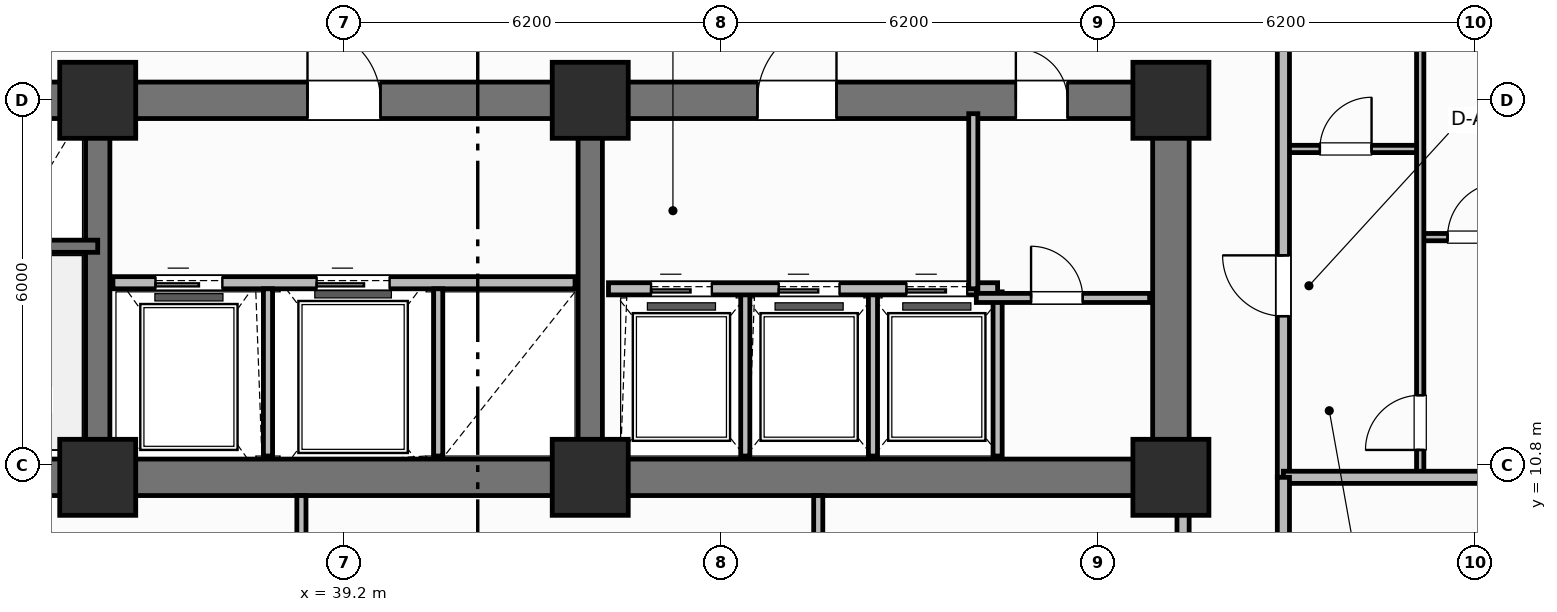
"""IFC4 building model, lengths in metres.
Left out: names, types, materials, properties, quantities, classifications, styles, units other than length and angle.
Written with IfcOpenShell. Run it as: python <this file> out.ifc"""

import sys

from ifc_helpers import new_model, si_unit, direction, frame, frame_2d, origin, origin_2d, place, context, subcontext, project, spatial, rectangle, extrude, element, fill, save


model = new_model("IFC4")
c1 = context("Model", 3, precision=1e-05, world=origin(), true_north=direction((0.0, 1.0)))
c2 = subcontext(c1, "Body", "Model", "MODEL_VIEW")
j1 = project(units=[si_unit("LENGTHUNIT", "METRE"), si_unit("PLANEANGLEUNIT", "RADIAN")], contexts=[c1])
p1 = place(None, origin())
s1 = spatial("IfcSite", under=j1, at=p1, CompositionType="ELEMENT")
p2 = place(p1, origin())
s2 = spatial("IfcBuilding", under=s1, at=p2, CompositionType="ELEMENT")
p3 = place(p2, frame((0.0, 0.0, 43.6)))
s3 = spatial("IfcBuildingStorey", under=s2, at=p3, CompositionType="ELEMENT", Elevation=43.6)
p4 = place(p3, frame((52.8, 10.6, 0.0), z_axis=(0.0, 0.0, 1.0), x_axis=(-1.0, 0.0, 0.0)))
e1 = element("IfcWall", 1, at=p4, inside=s3, PredefinedType="SHEAR", context=c2, shape_type="SweptSolid", body=[
    extrude(rectangle(XDim=27.2, YDim=0.6, at=frame_2d((13.6, 0.0))), origin(), (0.0, 0.0, 1.0), 3.7),
])
p5 = place(p3, frame((52.8, 10.9, 0.0), z_axis=(0.0, 0.0, 1.0), x_axis=(0.0, 1.0, 0.0)))
e2 = element("IfcWall", 2, at=p5, inside=s3, PredefinedType="SHEAR", context=c2, shape_type="SweptSolid", body=[
    extrude(rectangle(XDim=5.6, YDim=0.6, at=frame_2d((2.8, 0.0))), origin(), (0.0, 0.0, 1.0), 3.7),
])
p6 = place(p3, frame((25.6, 16.8, 0.0), z_axis=(0.0, 0.0, 1.0), x_axis=(1.0, 0.0, 0.0)))
e3 = element("IfcWall", 3, at=p6, inside=s3, PredefinedType="SHEAR", context=c2, shape_type="SweptSolid", body=[
    extrude(rectangle(XDim=27.2, YDim=0.6, at=frame_2d((13.6, 0.0))), origin(), (0.0, 0.0, 1.0), 3.7),
])
p7 = place(p6, frame((1.7, 0.0, 0.0)))
e4 = element("IfcOpeningElement", 4, at=p7, cuts=e3, PredefinedType="OPENING", context=c2, shape_type="SweptSolid", body=[
    extrude(rectangle(XDim=1.1, YDim=2.15, at=frame_2d((0.55, 1.075))), frame((0.0, 0.31, 0.0), z_axis=(0.0, -1.0, 0.0), x_axis=(1.0, 0.0, 0.0)), (0.0, 0.0, 1.0), 0.62),
])
p8 = place(p6, frame((4.45, 0.0, 0.0)))
e5 = element("IfcOpeningElement", 5, at=p8, cuts=e3, PredefinedType="OPENING", context=c2, shape_type="SweptSolid", body=[
    extrude(rectangle(XDim=0.85, YDim=2.1, at=frame_2d((0.425, 1.05))), frame((0.0, 0.31, 0.0), z_axis=(0.0, -1.0, 0.0), x_axis=(1.0, 0.0, 0.0)), (0.0, 0.0, 1.0), 0.62),
])
p9 = place(p6, frame((6.5, 0.0, 0.0)))
e6 = element("IfcOpeningElement", 6, at=p9, cuts=e3, PredefinedType="OPENING", context=c2, shape_type="SweptSolid", body=[
    extrude(rectangle(XDim=0.85, YDim=2.1, at=frame_2d((0.425, 1.05))), frame((0.0, 0.31, 0.0), z_axis=(0.0, -1.0, 0.0), x_axis=(1.0, 0.0, 0.0)), (0.0, 0.0, 1.0), 0.62),
])
p10 = place(p6, frame((13.0, 0.0, 0.0)))
e7 = element("IfcOpeningElement", 7, at=p10, cuts=e3, PredefinedType="OPENING", context=c2, shape_type="SweptSolid", body=[
    extrude(rectangle(XDim=1.2, YDim=2.15, at=frame_2d((0.6, 1.075))), frame((0.0, 0.31, 0.0), z_axis=(0.0, -1.0, 0.0), x_axis=(1.0, 0.0, 0.0)), (0.0, 0.0, 1.0), 0.62),
])
p11 = place(p6, frame((20.4, 0.0, 0.0)))
e8 = element("IfcOpeningElement", 8, at=p11, cuts=e3, PredefinedType="OPENING", context=c2, shape_type="SweptSolid", body=[
    extrude(rectangle(XDim=1.3, YDim=2.2, at=frame_2d((0.65, 1.1))), frame((0.0, 0.31, 0.0), z_axis=(0.0, -1.0, 0.0), x_axis=(1.0, 0.0, 0.0)), (0.0, 0.0, 1.0), 0.62),
])
p12 = place(p6, frame((24.65, 0.0, 0.0)))
e9 = element("IfcOpeningElement", 9, at=p12, cuts=e3, PredefinedType="OPENING", context=c2, shape_type="SweptSolid", body=[
    extrude(rectangle(XDim=0.85, YDim=2.1, at=frame_2d((0.425, 1.05))), frame((0.0, 0.31, 0.0), z_axis=(0.0, -1.0, 0.0), x_axis=(1.0, 0.0, 0.0)), (0.0, 0.0, 1.0), 0.62),
])
for number, where, z_axis, x_axis in (
    (10, (35.15, 10.9, 0.0), (0.0, 0.0, 1.0), (0.0, 1.0, 0.0)),
    (11, (43.25, 10.9, 0.0), (0.0, 0.0, 1.0), (0.0, 1.0, 0.0)),
):
    element("IfcWall", number, at=place(p3, frame(where, z_axis=z_axis, x_axis=x_axis)), inside=s3, PredefinedType="SHEAR", context=c2, shape_type="SweptSolid", body=[
        extrude(rectangle(XDim=5.6, YDim=0.4, at=frame_2d((2.8, 0.0))), origin(), (0.0, 0.0, 1.0), 3.7),
    ])
for number, where, z_axis, x_axis in (
    (12, (35.15, 10.6, 0.0), (0.0, 0.0, 1.0), (1.0, 0.0, 0.0)),
    (13, (35.15, 16.8, 0.0), (0.0, 0.0, 1.0), (1.0, 0.0, 0.0)),
    (14, (43.25, 10.6, 0.0), (0.0, 0.0, 1.0), (1.0, 0.0, 0.0)),
    (15, (43.25, 16.8, 0.0), (0.0, 0.0, 1.0), (1.0, 0.0, 0.0)),
    (16, (52.8, 10.6, 0.0), (0.0, 0.0, 1.0), (1.0, 0.0, 0.0)),
    (17, (52.8, 16.8, 0.0), (0.0, 0.0, 1.0), (1.0, 0.0, 0.0)),
):
    element("IfcColumn", number, at=place(p3, frame(where, z_axis=z_axis, x_axis=x_axis)), inside=s3, PredefinedType="COLUMN", context=c2, shape_type="SweptSolid", body=[
        extrude(rectangle(XDim=1.25, YDim=1.25, at=origin_2d()), origin(), (0.0, 0.0, 1.0), 3.7),
    ])
p13 = place(p3, frame((25.6, 14.4, 0.0), z_axis=(0.0, 0.0, 1.0), x_axis=(1.0, 0.0, 0.0)))
e18 = element("IfcWall", 18, at=p13, inside=s3, PredefinedType="SHEAR", context=c2, shape_type="SweptSolid", body=[
    extrude(rectangle(XDim=9.55, YDim=0.2, at=frame_2d((4.775, 0.0))), origin(), (0.0, 0.0, 1.0), 3.7),
])
p14 = place(p13, frame((1.05, 0.0, 0.0)))
e19 = element("IfcOpeningElement", 19, at=p14, cuts=e18, PredefinedType="OPENING", context=c2, shape_type="SweptSolid", body=[
    extrude(rectangle(XDim=1.1, YDim=2.15, at=frame_2d((0.55, 1.075))), frame((0.0, 0.11, 0.0), z_axis=(0.0, -1.0, 0.0), x_axis=(1.0, 0.0, 0.0)), (0.0, 0.0, 1.0), 0.22),
])
p15 = place(p3, frame((35.4, 13.8, 0.0), z_axis=(0.0, 0.0, 1.0), x_axis=(1.0, 0.0, 0.0)))
e20 = element("IfcWall", 20, at=p15, inside=s3, PredefinedType="PARTITIONING", context=c2, shape_type="SweptSolid", body=[
    extrude(rectangle(XDim=7.6, YDim=0.2, at=frame_2d((3.8, 0.0))), origin(), (0.0, 0.0, 1.0), 2.3),
])
p16 = place(p15, frame((0.7, 0.0, 0.0)))
e21 = element("IfcOpeningElement", 21, at=p16, cuts=e20, PredefinedType="OPENING", context=c2, shape_type="SweptSolid", body=[
    extrude(rectangle(XDim=1.1, YDim=2.15, at=frame_2d((0.55, 1.075))), frame((0.0, 0.11, 0.0), z_axis=(0.0, -1.0, 0.0), x_axis=(1.0, 0.0, 0.0)), (0.0, 0.0, 1.0), 0.22),
])
p17 = place(p15, frame((3.35, 0.0, 0.0)))
e22 = element("IfcOpeningElement", 22, at=p17, cuts=e20, PredefinedType="OPENING", context=c2, shape_type="SweptSolid", body=[
    extrude(rectangle(XDim=1.2, YDim=2.15, at=frame_2d((0.6, 1.075))), frame((0.0, 0.11, 0.0), z_axis=(0.0, -1.0, 0.0), x_axis=(1.0, 0.0, 0.0)), (0.0, 0.0, 1.0), 0.22),
])
for number, where, z_axis, x_axis in (
    (23, (37.95, 10.95, 0.0), (0.0, 0.0, 1.0), (0.0, 1.0, 0.0)),
    (24, (40.75, 10.95, 0.0), (0.0, 0.0, 1.0), (0.0, 1.0, 0.0)),
):
    element("IfcWall", number, at=place(p3, frame(where, z_axis=z_axis, x_axis=x_axis)), inside=s3, PredefinedType="PARTITIONING", context=c2, shape_type="SweptSolid", body=[
        extrude(rectangle(XDim=2.75, YDim=0.15, at=frame_2d((1.375, 0.0))), origin(), (0.0, 0.0, 1.0), 2.53),
    ])
for number, where, z_axis, x_axis in (
    (25, (45.8, 10.95, 0.0), (0.0, 0.0, 1.0), (0.0, 1.0, 0.0)),
    (26, (47.9, 10.95, 0.0), (0.0, 0.0, 1.0), (0.0, 1.0, 0.0)),
    (27, (49.95, 10.95, 0.0), (0.0, 0.0, 1.0), (0.0, 1.0, 0.0)),
):
    element("IfcWall", number, at=place(p3, frame(where, z_axis=z_axis, x_axis=x_axis)), inside=s3, PredefinedType="PARTITIONING", context=c2, shape_type="SweptSolid", body=[
        extrude(rectangle(XDim=2.7, YDim=0.15, at=frame_2d((1.35, 0.0))), origin(), (0.0, 0.0, 1.0), 2.53),
    ])
p18 = place(p3, frame((43.55, 13.7, 0.0), z_axis=(0.0, 0.0, 1.0), x_axis=(1.0, 0.0, 0.0)))
e28 = element("IfcWall", 28, at=p18, inside=s3, PredefinedType="PARTITIONING", context=c2, shape_type="SweptSolid", body=[
    extrude(rectangle(XDim=6.4, YDim=0.2, at=frame_2d((3.2, 0.0))), origin(), (0.0, 0.0, 1.0), 2.53),
])
p19 = place(p18, frame((0.7, 0.0, 0.0)))
e29 = element("IfcOpeningElement", 29, at=p19, cuts=e28, PredefinedType="OPENING", context=c2, shape_type="SweptSolid", body=[
    extrude(rectangle(XDim=1.0, YDim=2.15, at=frame_2d((0.5, 1.075))), frame((0.0, 0.11, 0.0), z_axis=(0.0, -1.0, 0.0), x_axis=(1.0, 0.0, 0.0)), (0.0, 0.0, 1.0), 0.22),
])
p20 = place(p18, frame((2.8, 0.0, 0.0)))
e30 = element("IfcOpeningElement", 30, at=p20, cuts=e28, PredefinedType="OPENING", context=c2, shape_type="SweptSolid", body=[
    extrude(rectangle(XDim=1.0, YDim=2.15, at=frame_2d((0.5, 1.075))), frame((0.0, 0.11, 0.0), z_axis=(0.0, -1.0, 0.0), x_axis=(1.0, 0.0, 0.0)), (0.0, 0.0, 1.0), 0.22),
])
p21 = place(p18, frame((4.9, 0.0, 0.0)))
e31 = element("IfcOpeningElement", 31, at=p21, cuts=e28, PredefinedType="OPENING", context=c2, shape_type="SweptSolid", body=[
    extrude(rectangle(XDim=1.0, YDim=2.15, at=frame_2d((0.5, 1.075))), frame((0.0, 0.11, 0.0), z_axis=(0.0, -1.0, 0.0), x_axis=(1.0, 0.0, 0.0)), (0.0, 0.0, 1.0), 0.22),
])
p22 = place(p3, frame((49.55, 13.7, 0.0), z_axis=(0.0, 0.0, 1.0), x_axis=(0.0, 1.0, 0.0)))
e32 = element("IfcWall", 32, at=p22, inside=s3, PredefinedType="PARTITIONING", context=c2, shape_type="SweptSolid", body=[
    extrude(rectangle(XDim=2.88, YDim=0.15, at=frame_2d((1.44, 0.0))), origin(), (0.0, 0.0, 1.0), 2.53),
])
p23 = place(p3, frame((49.6, 13.55, 0.0), z_axis=(0.0, 0.0, 1.0), x_axis=(1.0, 0.0, 0.0)))
e33 = element("IfcWall", 33, at=p23, inside=s3, PredefinedType="PARTITIONING", context=c2, shape_type="SweptSolid", body=[
    extrude(rectangle(XDim=2.85, YDim=0.15, at=frame_2d((1.425, 0.0))), origin(), (0.0, 0.0, 1.0), 2.53),
])
p24 = place(p23, frame((0.9, 0.0, 0.0)))
e34 = element("IfcOpeningElement", 34, at=p24, cuts=e33, PredefinedType="OPENING", context=c2, shape_type="SweptSolid", body=[
    extrude(rectangle(XDim=0.85, YDim=2.1, at=frame_2d((0.425, 1.05))), frame((0.0, 0.085, 0.0), z_axis=(0.0, -1.0, 0.0), x_axis=(1.0, 0.0, 0.0)), (0.0, 0.0, 1.0), 0.17),
])
p25 = place(p3, frame((54.65, 16.0, 0.0), z_axis=(0.0, 0.0, 1.0), x_axis=(1.0, 0.0, 0.0)))
e35 = element("IfcWall", 35, at=p25, inside=s3, PredefinedType="PARTITIONING", context=c2, shape_type="SweptSolid", body=[
    extrude(rectangle(XDim=2.25, YDim=0.12, at=frame_2d((1.125, 0.0))), origin(), (0.0, 0.0, 1.0), 2.53),
])
p26 = place(p25, frame((0.6, 0.0, 0.0)))
e36 = element("IfcOpeningElement", 36, at=p26, cuts=e35, PredefinedType="OPENING", context=c2, shape_type="SweptSolid", body=[
    extrude(rectangle(XDim=0.85, YDim=2.1, at=frame_2d((0.425, 1.05))), frame((0.0, 0.07, 0.0), z_axis=(0.0, -1.0, 0.0), x_axis=(1.0, 0.0, 0.0)), (0.0, 0.0, 1.0), 0.14),
])
p27 = place(p3, frame((56.9, 14.55, 0.0), z_axis=(0.0, 0.0, 1.0), x_axis=(1.0, 0.0, 0.0)))
e37 = element("IfcWall", 37, at=p27, inside=s3, PredefinedType="PARTITIONING", context=c2, shape_type="SweptSolid", body=[
    extrude(rectangle(XDim=6.93, YDim=0.12, at=frame_2d((3.465, 0.0))), origin(), (0.0, 0.0, 1.0), 2.53),
])
p28 = place(p27, frame((0.45, 0.0, 0.0)))
e38 = element("IfcOpeningElement", 38, at=p28, cuts=e37, PredefinedType="OPENING", context=c2, shape_type="SweptSolid", body=[
    extrude(rectangle(XDim=0.9, YDim=2.1, at=frame_2d((0.45, 1.05))), frame((0.0, 0.07, 0.0), z_axis=(0.0, -1.0, 0.0), x_axis=(1.0, 0.0, 0.0)), (0.0, 0.0, 1.0), 0.14),
])
p29 = place(p3, frame((56.9, 10.64, 0.0), z_axis=(0.0, 0.0, 1.0), x_axis=(0.0, 1.0, 0.0)))
e39 = element("IfcWall", 39, at=p29, inside=s3, PredefinedType="PARTITIONING", context=c2, shape_type="SweptSolid", body=[
    extrude(rectangle(XDim=15.92, YDim=0.12, at=frame_2d((7.96, 0.0))), origin(), (0.0, 0.0, 1.0), 2.53),
])
p30 = place(p29, frame((0.41, 0.0, 0.0)))
e40 = element("IfcOpeningElement", 40, at=p30, cuts=e39, PredefinedType="OPENING", context=c2, shape_type="SweptSolid", body=[
    extrude(rectangle(XDim=0.9, YDim=2.1, at=frame_2d((0.45, 1.05))), frame((0.0, 0.07, 0.0), z_axis=(0.0, -1.0, 0.0), x_axis=(1.0, 0.0, 0.0)), (0.0, 0.0, 1.0), 0.14),
])
p31 = place(p29, frame((13.125, 0.0, 0.0)))
e41 = element("IfcOpeningElement", 41, at=p31, cuts=e39, PredefinedType="OPENING", context=c2, shape_type="SweptSolid", body=[
    extrude(rectangle(XDim=0.82, YDim=2.08, at=frame_2d((0.41, 1.04))), frame((0.0, 0.07, 0.0), z_axis=(0.0, -1.0, 0.0), x_axis=(1.0, 0.0, 0.0)), (0.0, 0.0, 1.0), 0.14),
])
p32 = place(p3, frame((54.65, 10.6, 0.0), z_axis=(0.0, 0.0, 1.0), x_axis=(0.0, 1.0, 0.0)))
e42 = element("IfcWall", 42, at=p32, inside=s3, PredefinedType="PARTITIONING", context=c2, shape_type="SweptSolid", body=[
    extrude(rectangle(XDim=35.2, YDim=0.2, at=frame_2d((17.6, 0.0))), origin(), (0.0, 0.0, 1.0), 2.53),
])
p33 = place(p32, frame((2.65, 0.0, 0.0)))
e43 = element("IfcOpeningElement", 43, at=p33, cuts=e42, PredefinedType="OPENING", context=c2, shape_type="SweptSolid", body=[
    extrude(rectangle(XDim=1.0, YDim=2.15, at=frame_2d((0.5, 1.075))), frame((0.0, 0.11, 0.0), z_axis=(0.0, -1.0, 0.0), x_axis=(1.0, 0.0, 0.0)), (0.0, 0.0, 1.0), 0.22),
])
p34 = place(p32, frame((19.95, 0.0, 0.0)))
e44 = element("IfcOpeningElement", 44, at=p34, cuts=e42, PredefinedType="OPENING", context=c2, shape_type="SweptSolid", body=[
    extrude(rectangle(XDim=1.0, YDim=2.15, at=frame_2d((0.5, 1.075))), frame((0.0, 0.11, 0.0), z_axis=(0.0, -1.0, 0.0), x_axis=(1.0, 0.0, 0.0)), (0.0, 0.0, 1.0), 0.22),
])
p35 = place(p3, frame((54.65, 10.6, 0.0), z_axis=(0.0, 0.0, 1.0), x_axis=(1.0, 0.0, 0.0)))
e45 = element("IfcWall", 45, at=p35, inside=s3, PredefinedType="PARTITIONING", context=c2, shape_type="SweptSolid", body=[
    extrude(rectangle(XDim=8.76, YDim=0.2, at=frame_2d((4.38, 0.0))), origin(), (0.0, 0.0, 1.0), 2.53),
])
p36 = place(p3, frame((54.65, 4.97, 0.0), z_axis=(0.0, 0.0, 1.0), x_axis=(0.0, 1.0, 0.0)))
e46 = element("IfcWall", 46, at=p36, inside=s3, PredefinedType="PARTITIONING", context=c2, shape_type="SweptSolid", body=[
    extrude(rectangle(XDim=5.63, YDim=0.2, at=frame_2d((2.815, 0.0))), origin(), (0.0, 0.0, 1.0), 2.53),
])
p37 = place(p3, frame((38.5, 4.97, 0.0), z_axis=(0.0, 0.0, 1.0), x_axis=(0.0, 1.0, 0.0)))
e47 = element("IfcWall", 47, at=p37, inside=s3, PredefinedType="PARTITIONING", context=c2, shape_type="SweptSolid", body=[
    extrude(rectangle(XDim=5.33, YDim=0.15, at=frame_2d((2.665, 0.0))), origin(), (0.0, 0.0, 1.0), 2.53),
])
p38 = place(p3, frame((47.0, 4.97, 0.0), z_axis=(0.0, 0.0, 1.0), x_axis=(0.0, 1.0, 0.0)))
e48 = element("IfcWall", 48, at=p38, inside=s3, PredefinedType="PARTITIONING", context=c2, shape_type="SweptSolid", body=[
    extrude(rectangle(XDim=5.33, YDim=0.15, at=frame_2d((2.665, 0.0))), origin(), (0.0, 0.0, 1.0), 2.53),
])
p39 = place(p38, frame((1.6, 0.0, 0.0)))
e49 = element("IfcOpeningElement", 49, at=p39, cuts=e48, PredefinedType="OPENING", context=c2, shape_type="SweptSolid", body=[
    extrude(rectangle(XDim=0.9, YDim=2.1, at=frame_2d((0.45, 1.05))), frame((0.0, 0.085, 0.0), z_axis=(0.0, -1.0, 0.0), x_axis=(1.0, 0.0, 0.0)), (0.0, 0.0, 1.0), 0.17),
])
p40 = place(p3, frame((53.0, 5.92, 0.0), z_axis=(0.0, 0.0, 1.0), x_axis=(0.0, 1.0, 0.0)))
e50 = element("IfcWall", 50, at=p40, inside=s3, PredefinedType="PARTITIONING", context=c2, shape_type="SweptSolid", body=[
    extrude(rectangle(XDim=4.38, YDim=0.2, at=frame_2d((2.19, 0.0))), origin(), (0.0, 0.0, 1.0), 2.53),
])
p41 = place(p40, frame((0.85, 0.0, 0.0)))
e51 = element("IfcOpeningElement", 51, at=p41, cuts=e50, PredefinedType="OPENING", context=c2, shape_type="SweptSolid", body=[
    extrude(rectangle(XDim=0.9, YDim=2.1, at=frame_2d((0.45, 1.05))), frame((0.0, 0.11, 0.0), z_axis=(0.0, -1.0, 0.0), x_axis=(1.0, 0.0, 0.0)), (0.0, 0.0, 1.0), 0.22),
])
p42 = place(p16, origin())
e52 = element("IfcDoor", 52, at=p42, inside=s3, OperationType="SLIDING_TO_LEFT", PredefinedType="DOOR", context=c2, shape_type="SweptSolid", body=[
    extrude(rectangle(XDim=1.1, YDim=2.15, at=frame_2d((0.55, 1.075))), frame((0.0, 0.025, 0.0), z_axis=(0.0, -1.0, 0.0), x_axis=(1.0, 0.0, 0.0)), (0.0, 0.0, 1.0), 0.05),
])
fill(e21, e52)
p43 = place(p17, origin())
e53 = element("IfcDoor", 53, at=p43, inside=s3, OperationType="SLIDING_TO_LEFT", PredefinedType="DOOR", context=c2, shape_type="SweptSolid", body=[
    extrude(rectangle(XDim=1.2, YDim=2.15, at=frame_2d((0.6, 1.075))), frame((0.0, 0.025, 0.0), z_axis=(0.0, -1.0, 0.0), x_axis=(1.0, 0.0, 0.0)), (0.0, 0.0, 1.0), 0.05),
])
fill(e22, e53)
p44 = place(p19, origin())
e54 = element("IfcDoor", 54, at=p44, inside=s3, OperationType="SLIDING_TO_LEFT", PredefinedType="DOOR", context=c2, shape_type="SweptSolid", body=[
    extrude(rectangle(XDim=1.0, YDim=2.15, at=frame_2d((0.5, 1.075))), frame((0.0, 0.025, 0.0), z_axis=(0.0, -1.0, 0.0), x_axis=(1.0, 0.0, 0.0)), (0.0, 0.0, 1.0), 0.05),
])
fill(e29, e54)
p45 = place(p20, origin())
e55 = element("IfcDoor", 55, at=p45, inside=s3, OperationType="SLIDING_TO_LEFT", PredefinedType="DOOR", context=c2, shape_type="SweptSolid", body=[
    extrude(rectangle(XDim=1.0, YDim=2.15, at=frame_2d((0.5, 1.075))), frame((0.0, 0.025, 0.0), z_axis=(0.0, -1.0, 0.0), x_axis=(1.0, 0.0, 0.0)), (0.0, 0.0, 1.0), 0.05),
])
fill(e30, e55)
p46 = place(p21, origin())
e56 = element("IfcDoor", 56, at=p46, inside=s3, OperationType="SLIDING_TO_LEFT", PredefinedType="DOOR", context=c2, shape_type="SweptSolid", body=[
    extrude(rectangle(XDim=1.0, YDim=2.15, at=frame_2d((0.5, 1.075))), frame((0.0, 0.025, 0.0), z_axis=(0.0, -1.0, 0.0), x_axis=(1.0, 0.0, 0.0)), (0.0, 0.0, 1.0), 0.05),
])
fill(e31, e56)
p47 = place(p24, origin())
e57 = element("IfcDoor", 57, at=p47, inside=s3, OperationType="SINGLE_SWING_LEFT", PredefinedType="DOOR", context=c2, shape_type="SweptSolid", body=[
    extrude(rectangle(XDim=0.85, YDim=2.1, at=frame_2d((0.425, 1.05))), frame((0.0, 0.025, 0.0), z_axis=(0.0, -1.0, 0.0), x_axis=(1.0, 0.0, 0.0)), (0.0, 0.0, 1.0), 0.05),
])
fill(e34, e57)
p48 = place(p26, origin())
e58 = element("IfcDoor", 58, at=p48, inside=s3, OperationType="SINGLE_SWING_RIGHT", PredefinedType="DOOR", context=c2, shape_type="SweptSolid", body=[
    extrude(rectangle(XDim=0.85, YDim=2.1, at=frame_2d((0.425, 1.05))), frame((0.0, 0.025, 0.0), z_axis=(0.0, -1.0, 0.0), x_axis=(1.0, 0.0, 0.0)), (0.0, 0.0, 1.0), 0.05),
])
fill(e36, e58)
p49 = place(p28, origin())
e59 = element("IfcDoor", 59, at=p49, inside=s3, OperationType="SINGLE_SWING_RIGHT", PredefinedType="DOOR", context=c2, shape_type="SweptSolid", body=[
    extrude(rectangle(XDim=0.9, YDim=2.1, at=frame_2d((0.45, 1.05))), frame((0.0, 0.025, 0.0), z_axis=(0.0, -1.0, 0.0), x_axis=(1.0, 0.0, 0.0)), (0.0, 0.0, 1.0), 0.05),
])
fill(e38, e59)
p50 = place(p30, origin())
e60 = element("IfcDoor", 60, at=p50, inside=s3, OperationType="SINGLE_SWING_LEFT", PredefinedType="DOOR", context=c2, shape_type="SweptSolid", body=[
    extrude(rectangle(XDim=0.9, YDim=2.1, at=frame_2d((0.45, 1.05))), frame((0.0, 0.025, 0.0), z_axis=(0.0, -1.0, 0.0), x_axis=(1.0, 0.0, 0.0)), (0.0, 0.0, 1.0), 0.05),
])
fill(e40, e60)
p51 = place(p33, origin())
e61 = element("IfcDoor", 61, at=p51, inside=s3, OperationType="SINGLE_SWING_RIGHT", PredefinedType="DOOR", context=c2, shape_type="SweptSolid", body=[
    extrude(rectangle(XDim=1.0, YDim=2.15, at=frame_2d((0.5, 1.075))), frame((0.0, 0.025, 0.0), z_axis=(0.0, -1.0, 0.0), x_axis=(1.0, 0.0, 0.0)), (0.0, 0.0, 1.0), 0.05),
])
fill(e43, e61)
p52 = place(p10, origin())
e62 = element("IfcDoor", 62, at=p52, inside=s3, OperationType="SINGLE_SWING_LEFT", PredefinedType="DOOR", context=c2, shape_type="SweptSolid", body=[
    extrude(rectangle(XDim=1.2, YDim=2.15, at=frame_2d((0.6, 1.075))), frame((0.0, 0.025, 0.0), z_axis=(0.0, -1.0, 0.0), x_axis=(1.0, 0.0, 0.0)), (0.0, 0.0, 1.0), 0.05),
])
fill(e7, e62)
p53 = place(p11, origin())
e63 = element("IfcDoor", 63, at=p53, inside=s3, OperationType="SINGLE_SWING_RIGHT", PredefinedType="DOOR", context=c2, shape_type="SweptSolid", body=[
    extrude(rectangle(XDim=1.3, YDim=2.2, at=frame_2d((0.65, 1.1))), frame((0.0, 0.025, 0.0), z_axis=(0.0, -1.0, 0.0), x_axis=(1.0, 0.0, 0.0)), (0.0, 0.0, 1.0), 0.05),
])
fill(e8, e63)
p54 = place(p12, origin())
e64 = element("IfcDoor", 64, at=p54, inside=s3, OperationType="SINGLE_SWING_LEFT", PredefinedType="DOOR", context=c2, shape_type="SweptSolid", body=[
    extrude(rectangle(XDim=0.85, YDim=2.1, at=frame_2d((0.425, 1.05))), frame((0.0, 0.025, 0.0), z_axis=(0.0, -1.0, 0.0), x_axis=(1.0, 0.0, 0.0)), (0.0, 0.0, 1.0), 0.05),
])
fill(e9, e64)
save(model, sys.argv[1])
